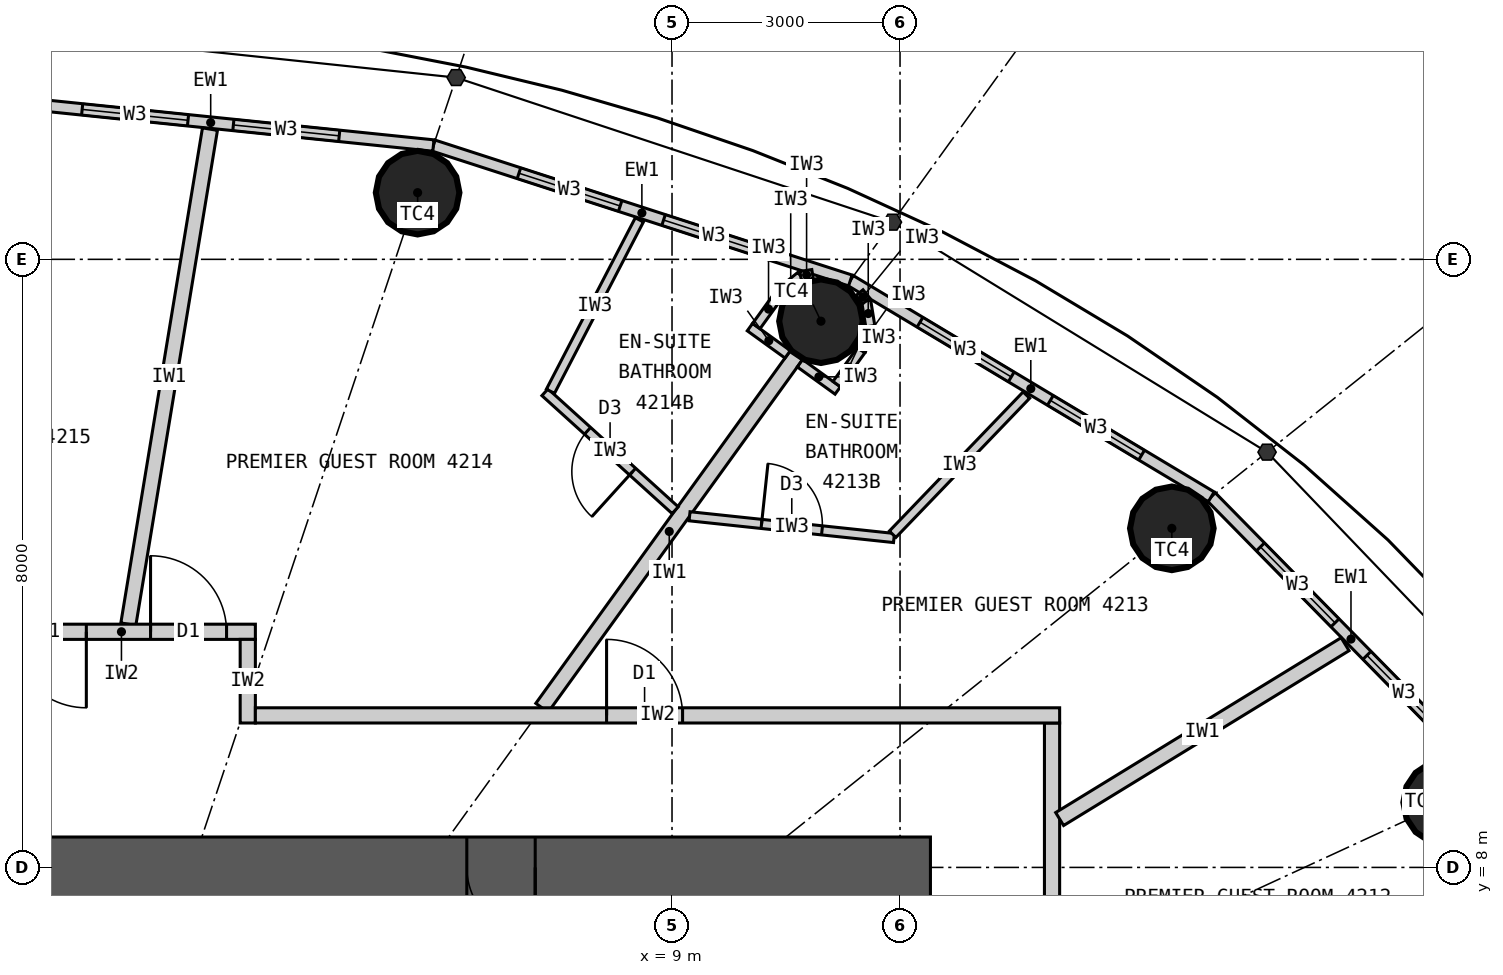
"""IFC4 building model, lengths in metres.
Left out: names, types, materials, properties, quantities, classifications, styles, units other than length and angle.
Written with IfcOpenShell. Run it as: python <this file> out.ifc"""

import sys

from ifc_helpers import new_model, si_unit, direction, frame, frame_2d, origin, origin_2d, place, context, subcontext, project, spatial, rectangle, circle, extrude, element, fill, save


model = new_model("IFC4")
c1 = context("Model", 3, precision=1e-05, world=origin(), true_north=direction((0.0, 1.0)))
c2 = subcontext(c1, "Body", "Model", "MODEL_VIEW")
j1 = project(units=[si_unit("LENGTHUNIT", "METRE"), si_unit("PLANEANGLEUNIT", "RADIAN")], contexts=[c1])
p1 = place(None, origin())
s1 = spatial("IfcSite", under=j1, at=p1, CompositionType="ELEMENT")
p2 = place(p1, origin())
s2 = spatial("IfcBuilding", under=s1, at=p2, CompositionType="ELEMENT")
p3 = place(p2, frame((0.0, 0.0, 159.9)))
s3 = spatial("IfcBuildingStorey", under=s2, at=p3, CompositionType="ELEMENT", Elevation=159.9)
for number, where, z_axis, x_axis in (
    (1, (19.172, 8.855, 0.0), (0.0, 0.0, 1.0), (1.0, 0.0, 0.0)),
    (2, (15.576, 12.461, 0.0), (0.0, 0.0, 1.0), (1.0, 0.0, 0.0)),
    (3, (10.96, 15.186, 0.0), (0.0, 0.0, 1.0), (1.0, 0.0, 0.0)),
    (4, (5.653, 16.877, 0.0), (0.0, 0.0, 1.0), (1.0, 0.0, 0.0)),
):
    element("IfcColumn", number, at=place(p3, frame(where, z_axis=z_axis, x_axis=x_axis)), inside=s3, PredefinedType="COLUMN", context=c2, shape_type="SweptSolid", body=[
        extrude(circle(Radius=0.55, at=origin_2d()), origin(), (0.0, 0.0, 1.0), 3.3),
    ])
p4 = place(p3, frame((-12.4, 8.0, 0.0), z_axis=(0.0, 0.0, 1.0), x_axis=(1.0, 0.0, 0.0)))
e5 = element("IfcWall", 5, at=p4, inside=s3, PredefinedType="SHEAR", context=c2, shape_type="SweptSolid", body=[
    extrude(rectangle(XDim=24.8, YDim=0.8, at=frame_2d((12.4, 0.0))), origin(), (0.0, 0.0, 1.0), 3.3),
])
p5 = place(p4, frame((11.1, 0.0, 0.0)))
e6 = element("IfcOpeningElement", 6, at=p5, cuts=e5, PredefinedType="OPENING", context=c2, shape_type="SweptSolid", body=[
    extrude(rectangle(XDim=1.2, YDim=2.2, at=frame_2d((0.6, 1.1))), frame((0.0, 0.41, 0.0), z_axis=(0.0, -1.0, 0.0), x_axis=(1.0, 0.0, 0.0)), (0.0, 0.0, 1.0), 0.82),
])
p6 = place(p4, frame((18.7, 0.0, 0.0)))
e7 = element("IfcOpeningElement", 7, at=p6, cuts=e5, PredefinedType="OPENING", context=c2, shape_type="SweptSolid", body=[
    extrude(rectangle(XDim=0.9, YDim=2.2, at=frame_2d((0.45, 1.1))), frame((0.0, 0.41, 0.0), z_axis=(0.0, -1.0, 0.0), x_axis=(1.0, 0.0, 0.0)), (0.0, 0.0, 1.0), 0.82),
])
p7 = place(p3, frame((19.772, 9.132, 0.0), z_axis=(0.0, 0.0, 1.0), x_axis=(-0.700727467776, 0.71342905457, 0.0)))
e8 = element("IfcWall", 8, at=p7, inside=s3, PredefinedType="ELEMENTEDWALL", context=c2, shape_type="SweptSolid", body=[
    extrude(rectangle(XDim=5.247, YDim=0.15, at=frame_2d((2.624, 0.0))), origin(), (0.0, 0.0, 1.0), 3.12),
])
p8 = place(p7, frame((0.924, 0.0, 0.9)))
e9 = element("IfcOpeningElement", 9, at=p8, cuts=e8, PredefinedType="OPENING", context=c2, shape_type="SweptSolid", body=[
    extrude(rectangle(XDim=1.4, YDim=1.9, at=frame_2d((0.7, 0.95))), frame((0.0, 0.085, 0.0), z_axis=(0.0, -1.0, 0.0), x_axis=(1.0, 0.0, 0.0)), (0.0, 0.0, 1.0), 0.17),
])
p9 = place(p7, frame((2.924, 0.0, 0.9)))
e10 = element("IfcOpeningElement", 10, at=p9, cuts=e8, PredefinedType="OPENING", context=c2, shape_type="SweptSolid", body=[
    extrude(rectangle(XDim=1.4, YDim=1.9, at=frame_2d((0.7, 0.95))), frame((0.0, 0.085, 0.0), z_axis=(0.0, -1.0, 0.0), x_axis=(1.0, 0.0, 0.0)), (0.0, 0.0, 1.0), 0.17),
])
p10 = place(p3, frame((16.095, 12.876, 0.0), z_axis=(0.0, 0.0, 1.0), x_axis=(-0.857695199231, 0.514158482587, 0.0)))
e11 = element("IfcWall", 11, at=p10, inside=s3, PredefinedType="ELEMENTEDWALL", context=c2, shape_type="SweptSolid", body=[
    extrude(rectangle(XDim=5.536, YDim=0.15, at=frame_2d((2.768, 0.0))), origin(), (0.0, 0.0, 1.0), 3.12),
])
p11 = place(p10, frame((1.068, 0.0, 0.9)))
e12 = element("IfcOpeningElement", 12, at=p11, cuts=e11, PredefinedType="OPENING", context=c2, shape_type="SweptSolid", body=[
    extrude(rectangle(XDim=1.4, YDim=1.9, at=frame_2d((0.7, 0.95))), frame((0.0, 0.085, 0.0), z_axis=(0.0, -1.0, 0.0), x_axis=(1.0, 0.0, 0.0)), (0.0, 0.0, 1.0), 0.17),
])
p12 = place(p10, frame((3.068, 0.0, 0.9)))
e13 = element("IfcOpeningElement", 13, at=p12, cuts=e11, PredefinedType="OPENING", context=c2, shape_type="SweptSolid", body=[
    extrude(rectangle(XDim=1.4, YDim=1.9, at=frame_2d((0.7, 0.95))), frame((0.0, 0.085, 0.0), z_axis=(0.0, -1.0, 0.0), x_axis=(1.0, 0.0, 0.0)), (0.0, 0.0, 1.0), 0.17),
])
p13 = place(p3, frame((11.346, 15.722, 0.0), z_axis=(0.0, 0.0, 1.0), x_axis=(-0.951432482129, 0.307857486429, 0.0)))
e14 = element("IfcWall", 14, at=p13, inside=s3, PredefinedType="ELEMENTEDWALL", context=c2, shape_type="SweptSolid", body=[
    extrude(rectangle(XDim=5.766, YDim=0.15, at=frame_2d((2.883, 0.0))), origin(), (0.0, 0.0, 1.0), 3.12),
])
p14 = place(p13, frame((1.183, 0.0, 0.9)))
e15 = element("IfcOpeningElement", 15, at=p14, cuts=e14, PredefinedType="OPENING", context=c2, shape_type="SweptSolid", body=[
    extrude(rectangle(XDim=1.4, YDim=1.9, at=frame_2d((0.7, 0.95))), frame((0.0, 0.085, 0.0), z_axis=(0.0, -1.0, 0.0), x_axis=(1.0, 0.0, 0.0)), (0.0, 0.0, 1.0), 0.17),
])
p15 = place(p13, frame((3.183, 0.0, 0.9)))
e16 = element("IfcOpeningElement", 16, at=p15, cuts=e14, PredefinedType="OPENING", context=c2, shape_type="SweptSolid", body=[
    extrude(rectangle(XDim=1.4, YDim=1.9, at=frame_2d((0.7, 0.95))), frame((0.0, 0.085, 0.0), z_axis=(0.0, -1.0, 0.0), x_axis=(1.0, 0.0, 0.0)), (0.0, 0.0, 1.0), 0.17),
])
p16 = place(p3, frame((5.86, 17.497, 0.0), z_axis=(0.0, 0.0, 1.0), x_axis=(-0.994751738032, 0.102318032045, 0.0)))
e17 = element("IfcWall", 17, at=p16, inside=s3, PredefinedType="ELEMENTEDWALL", context=c2, shape_type="SweptSolid", body=[
    extrude(rectangle(XDim=5.891, YDim=0.15, at=frame_2d((2.946, 0.0))), origin(), (0.0, 0.0, 1.0), 3.12),
])
p17 = place(p16, frame((1.246, 0.0, 0.9)))
e18 = element("IfcOpeningElement", 18, at=p17, cuts=e17, PredefinedType="OPENING", context=c2, shape_type="SweptSolid", body=[
    extrude(rectangle(XDim=1.4, YDim=1.9, at=frame_2d((0.7, 0.95))), frame((0.0, 0.085, 0.0), z_axis=(0.0, -1.0, 0.0), x_axis=(1.0, 0.0, 0.0)), (0.0, 0.0, 1.0), 0.17),
])
p18 = place(p16, frame((3.246, 0.0, 0.9)))
e19 = element("IfcOpeningElement", 19, at=p18, cuts=e17, PredefinedType="OPENING", context=c2, shape_type="SweptSolid", body=[
    extrude(rectangle(XDim=1.4, YDim=1.9, at=frame_2d((0.7, 0.95))), frame((0.0, 0.085, 0.0), z_axis=(0.0, -1.0, 0.0), x_axis=(1.0, 0.0, 0.0)), (0.0, 0.0, 1.0), 0.17),
])
p19 = place(p3, frame((14.0, -9.9, 0.0), z_axis=(0.0, 0.0, 1.0), x_axis=(0.0, 1.0, 0.0)))
e20 = element("IfcWall", 20, at=p19, inside=s3, PredefinedType="PARTITIONING", context=c2, shape_type="SweptSolid", body=[
    extrude(rectangle(XDim=19.8, YDim=0.2, at=frame_2d((9.9, 0.0))), origin(), (0.0, 0.0, 1.0), 3.12),
])
p20 = place(p19, frame((3.824, 0.0, 0.0)))
e21 = element("IfcOpeningElement", 21, at=p20, cuts=e20, PredefinedType="OPENING", context=c2, shape_type="SweptSolid", body=[
    extrude(rectangle(XDim=1.0, YDim=2.2, at=frame_2d((0.5, 1.1))), frame((0.0, 0.11, 0.0), z_axis=(0.0, -1.0, 0.0), x_axis=(1.0, 0.0, 0.0)), (0.0, 0.0, 1.0), 0.22),
])
p21 = place(p19, frame((8.719, 0.0, 0.0)))
e22 = element("IfcOpeningElement", 22, at=p21, cuts=e20, PredefinedType="OPENING", context=c2, shape_type="SweptSolid", body=[
    extrude(rectangle(XDim=1.0, YDim=2.2, at=frame_2d((0.5, 1.1))), frame((0.0, 0.11, 0.0), z_axis=(0.0, -1.0, 0.0), x_axis=(1.0, 0.0, 0.0)), (0.0, 0.0, 1.0), 0.22),
])
p22 = place(p19, frame((15.482, 0.0, 0.0)))
e23 = element("IfcOpeningElement", 23, at=p22, cuts=e20, PredefinedType="OPENING", context=c2, shape_type="SweptSolid", body=[
    extrude(rectangle(XDim=1.0, YDim=2.2, at=frame_2d((0.5, 1.1))), frame((0.0, 0.11, 0.0), z_axis=(0.0, -1.0, 0.0), x_axis=(1.0, 0.0, 0.0)), (0.0, 0.0, 1.0), 0.22),
])
p23 = place(p3, frame((14.1, 8.636, 0.0), z_axis=(0.0, 0.0, 1.0), x_axis=(0.852731884196, 0.522348862041, 0.0)))
e24 = element("IfcWall", 24, at=p23, inside=s3, PredefinedType="PARTITIONING", context=c2, shape_type="SweptSolid", body=[
    extrude(rectangle(XDim=4.404, YDim=0.2, at=frame_2d((2.202, 0.0))), origin(), (0.0, 0.0, 1.0), 3.12),
])
p24 = place(p3, frame((7.289, 10.1, 0.0), z_axis=(0.0, 0.0, 1.0), x_axis=(0.585222595178, 0.810872686735, 0.0)))
e25 = element("IfcWall", 25, at=p24, inside=s3, PredefinedType="PARTITIONING", context=c2, shape_type="SweptSolid", body=[
    extrude(rectangle(XDim=5.722, YDim=0.2, at=frame_2d((2.861, 0.0))), origin(), (0.0, 0.0, 1.0), 2.42),
])
p25 = place(p3, frame((1.847, 11.2, 0.0), z_axis=(0.0, 0.0, 1.0), x_axis=(0.162695449404, 0.986676335352, 0.0)))
e26 = element("IfcWall", 26, at=p25, inside=s3, PredefinedType="PARTITIONING", context=c2, shape_type="SweptSolid", body=[
    extrude(rectangle(XDim=6.601, YDim=0.2, at=frame_2d((3.301, 0.0))), origin(), (0.0, 0.0, 1.0), 3.12),
])
p26 = place(p3, frame((-0.006, 11.1, 0.0), z_axis=(0.0, 0.0, 1.0), x_axis=(1.0, 0.0, 0.0)))
e27 = element("IfcWall", 27, at=p26, inside=s3, PredefinedType="PARTITIONING", context=c2, shape_type="SweptSolid", body=[
    extrude(rectangle(XDim=3.524, YDim=0.2, at=frame_2d((1.762, 0.0))), origin(), (0.0, 0.0, 1.0), 3.12),
])
p27 = place(p26, frame((2.145, 0.0, 0.0)))
e28 = element("IfcOpeningElement", 28, at=p27, cuts=e27, PredefinedType="OPENING", context=c2, shape_type="SweptSolid", body=[
    extrude(rectangle(XDim=1.0, YDim=2.2, at=frame_2d((0.5, 1.1))), frame((0.0, 0.11, 0.0), z_axis=(0.0, -1.0, 0.0), x_axis=(1.0, 0.0, 0.0)), (0.0, 0.0, 1.0), 0.22),
])
p28 = place(p26, frame((0.3, 0.0, 0.0)))
e29 = element("IfcOpeningElement", 29, at=p28, cuts=e27, PredefinedType="OPENING", context=c2, shape_type="SweptSolid", body=[
    extrude(rectangle(XDim=1.0, YDim=2.2, at=frame_2d((0.5, 1.1))), frame((0.0, 0.11, 0.0), z_axis=(0.0, -1.0, 0.0), x_axis=(1.0, 0.0, 0.0)), (0.0, 0.0, 1.0), 0.22),
])
p29 = place(p3, frame((3.418, 9.9, 0.0), z_axis=(0.0, 0.0, 1.0), x_axis=(0.0, 1.0, 0.0)))
e30 = element("IfcWall", 30, at=p29, inside=s3, PredefinedType="PARTITIONING", context=c2, shape_type="SweptSolid", body=[
    extrude(rectangle(XDim=1.1, YDim=0.2, at=frame_2d((0.55, 0.0))), origin(), (0.0, 0.0, 1.0), 3.12),
])
p30 = place(p3, frame((9.231, 12.62, 0.0), z_axis=(0.0, 0.0, 1.0), x_axis=(0.99437860496, -0.10588290701, 0.0)))
e31 = element("IfcWall", 31, at=p30, inside=s3, PredefinedType="PARTITIONING", context=c2, shape_type="SweptSolid", body=[
    extrude(rectangle(XDim=2.705, YDim=0.12, at=frame_2d((1.352, 0.0))), origin(), (0.0, 0.0, 1.0), 3.12),
])
p31 = place(p30, frame((0.952, 0.0, 0.0)))
e32 = element("IfcOpeningElement", 32, at=p31, cuts=e31, PredefinedType="OPENING", context=c2, shape_type="SweptSolid", body=[
    extrude(rectangle(XDim=0.8, YDim=2.1, at=frame_2d((0.4, 1.05))), frame((0.0, 0.07, 0.0), z_axis=(0.0, -1.0, 0.0), x_axis=(1.0, 0.0, 0.0)), (0.0, 0.0, 1.0), 0.14),
])
p32 = place(p3, frame((11.902, 12.383, 0.0), z_axis=(0.0, 0.0, 1.0), x_axis=(0.69298385335, 0.720953104574, 0.0)))
e33 = element("IfcWall", 33, at=p32, inside=s3, PredefinedType="PARTITIONING", context=c2, shape_type="SweptSolid", body=[
    extrude(rectangle(XDim=2.54, YDim=0.12, at=frame_2d((1.27, 0.0))), origin(), (0.0, 0.0, 1.0), 3.12),
])
p33 = place(p3, frame((10.684, 14.633, 0.0), z_axis=(0.0, 0.0, 1.0), x_axis=(0.810921075692, -0.585155542568, 0.0)))
e34 = element("IfcWall", 34, at=p33, inside=s3, PredefinedType="PARTITIONING", context=c2, shape_type="SweptSolid", body=[
    extrude(rectangle(XDim=0.612, YDim=0.12, at=frame_2d((0.306, 0.0))), origin(), (0.0, 0.0, 1.0), 3.12),
])
p34 = place(p3, frame((11.167, 14.359, 0.0), z_axis=(0.0, 0.0, 1.0), x_axis=(0.585263549799, 0.810843127415, 0.0)))
e35 = element("IfcWall", 35, at=p34, inside=s3, PredefinedType="PARTITIONING", context=c2, shape_type="SweptSolid", body=[
    extrude(rectangle(XDim=0.55, YDim=0.12, at=frame_2d((0.275, 0.0))), origin(), (0.0, 0.0, 1.0), 3.12),
])
for number, where, z_axis, x_axis in (
    (36, (11.489, 14.804, 0.0), (0.0, 0.0, 1.0), (0.356, 0.935, 0.0)),
    (37, (11.609, 15.12, 0.0), (0.0, 0.0, 1.0), (-0.16, 0.987, 0.0)),
):
    element("IfcWall", number, at=place(p3, frame(where, z_axis=z_axis, x_axis=x_axis)), inside=s3, PredefinedType="PARTITIONING", context=c2, shape_type="SweptSolid", body=[
        extrude(rectangle(XDim=0.338, YDim=0.12, at=frame_2d((0.169, 0.0))), origin(), (0.0, 0.0, 1.0), 3.12),
    ])
p35 = place(p3, frame((11.555, 15.453, 0.0), z_axis=(0.0, 0.0, 1.0), x_axis=(-0.631711901025, 0.775203246964, 0.0)))
e38 = element("IfcWall", 38, at=p35, inside=s3, PredefinedType="PARTITIONING", context=c2, shape_type="SweptSolid", body=[
    extrude(rectangle(XDim=0.139, YDim=0.12, at=frame_2d((0.07, 0.0))), origin(), (0.0, 0.0, 1.0), 3.12),
])
p36 = place(p3, frame((9.042, 12.699, 0.0), z_axis=(0.0, 0.0, 1.0), x_axis=(-0.741100257539, 0.671394376112, 0.0)))
e39 = element("IfcWall", 39, at=p36, inside=s3, PredefinedType="PARTITIONING", context=c2, shape_type="SweptSolid", body=[
    extrude(rectangle(XDim=2.312, YDim=0.12, at=frame_2d((1.156, 0.0))), origin(), (0.0, 0.0, 1.0), 3.12),
])
p37 = place(p36, frame((0.756, 0.0, 0.0)))
e40 = element("IfcOpeningElement", 40, at=p37, cuts=e39, PredefinedType="OPENING", context=c2, shape_type="SweptSolid", body=[
    extrude(rectangle(XDim=0.8, YDim=2.1, at=frame_2d((0.4, 1.05))), frame((0.0, 0.07, 0.0), z_axis=(0.0, -1.0, 0.0), x_axis=(1.0, 0.0, 0.0)), (0.0, 0.0, 1.0), 0.14),
])
p38 = place(p3, frame((7.401, 14.264, 0.0), z_axis=(0.0, 0.0, 1.0), x_axis=(0.460505131319, 0.887657041897, 0.0)))
e41 = element("IfcWall", 41, at=p38, inside=s3, PredefinedType="PARTITIONING", context=c2, shape_type="SweptSolid", body=[
    extrude(rectangle(XDim=2.54, YDim=0.12, at=frame_2d((1.27, 0.0))), origin(), (0.0, 0.0, 1.0), 3.12),
])
p39 = place(p3, frame((10.522, 14.75, 0.0), z_axis=(0.0, 0.0, 1.0), x_axis=(-0.811057588427, 0.584966313777, 0.0)))
e42 = element("IfcWall", 42, at=p39, inside=s3, PredefinedType="PARTITIONING", context=c2, shape_type="SweptSolid", body=[
    extrude(rectangle(XDim=0.612, YDim=0.12, at=frame_2d((0.306, 0.0))), origin(), (0.0, 0.0, 1.0), 3.12),
])
p40 = place(p3, frame((10.109, 15.122, 0.0), z_axis=(0.0, 0.0, 1.0), x_axis=(0.585344718358, 0.810784534072, 0.0)))
e43 = element("IfcWall", 43, at=p40, inside=s3, PredefinedType="PARTITIONING", context=c2, shape_type="SweptSolid", body=[
    extrude(rectangle(XDim=0.55, YDim=0.12, at=frame_2d((0.275, 0.0))), origin(), (0.0, 0.0, 1.0), 3.12),
])
p41 = place(p3, frame((10.431, 15.568, 0.0), z_axis=(0.0, 0.0, 1.0), x_axis=(0.77505137267, 0.631898227345, 0.0)))
e44 = element("IfcWall", 44, at=p41, inside=s3, PredefinedType="PARTITIONING", context=c2, shape_type="SweptSolid", body=[
    extrude(rectangle(XDim=0.338, YDim=0.12, at=frame_2d((0.169, 0.0))), origin(), (0.0, 0.0, 1.0), 3.12),
])
p42 = place(p3, frame((10.693, 15.781, 0.0), z_axis=(0.0, 0.0, 1.0), x_axis=(0.987256785332, 0.159135287777, 0.0)))
e45 = element("IfcWall", 45, at=p42, inside=s3, PredefinedType="PARTITIONING", context=c2, shape_type="SweptSolid", body=[
    extrude(rectangle(XDim=0.158, YDim=0.12, at=frame_2d((0.079, 0.0))), origin(), (0.0, 0.0, 1.0), 3.12),
])
p43 = place(p3, frame((3.518, 10.0, 0.0), z_axis=(0.0, 0.0, 1.0), x_axis=(1.0, 0.0, 0.0)))
e46 = element("IfcWall", 46, at=p43, inside=s3, PredefinedType="PARTITIONING", context=c2, shape_type="SweptSolid", body=[
    extrude(rectangle(XDim=10.582, YDim=0.2, at=frame_2d((5.291, 0.0))), origin(), (0.0, 0.0, 1.0), 3.12),
])
p44 = place(p43, frame((4.621, 0.0, 0.0)))
e47 = element("IfcOpeningElement", 47, at=p44, cuts=e46, PredefinedType="OPENING", context=c2, shape_type="SweptSolid", body=[
    extrude(rectangle(XDim=1.0, YDim=2.2, at=frame_2d((0.5, 1.1))), frame((0.0, 0.11, 0.0), z_axis=(0.0, -1.0, 0.0), x_axis=(1.0, 0.0, 0.0)), (0.0, 0.0, 1.0), 0.22),
])
p45 = place(p8, origin())
e48 = element("IfcWindow", 48, at=p45, inside=s3, PartitioningType="SINGLE_PANEL", PredefinedType="WINDOW", context=c2, shape_type="SweptSolid", body=[
    extrude(rectangle(XDim=1.4, YDim=1.9, at=frame_2d((0.7, 0.95))), frame((0.0, 0.03, 0.0), z_axis=(0.0, -1.0, 0.0), x_axis=(1.0, 0.0, 0.0)), (0.0, 0.0, 1.0), 0.06),
])
fill(e9, e48)
p46 = place(p9, origin())
e49 = element("IfcWindow", 49, at=p46, inside=s3, PartitioningType="SINGLE_PANEL", PredefinedType="WINDOW", context=c2, shape_type="SweptSolid", body=[
    extrude(rectangle(XDim=1.4, YDim=1.9, at=frame_2d((0.7, 0.95))), frame((0.0, 0.03, 0.0), z_axis=(0.0, -1.0, 0.0), x_axis=(1.0, 0.0, 0.0)), (0.0, 0.0, 1.0), 0.06),
])
fill(e10, e49)
p47 = place(p11, origin())
e50 = element("IfcWindow", 50, at=p47, inside=s3, PartitioningType="SINGLE_PANEL", PredefinedType="WINDOW", context=c2, shape_type="SweptSolid", body=[
    extrude(rectangle(XDim=1.4, YDim=1.9, at=frame_2d((0.7, 0.95))), frame((0.0, 0.03, 0.0), z_axis=(0.0, -1.0, 0.0), x_axis=(1.0, 0.0, 0.0)), (0.0, 0.0, 1.0), 0.06),
])
fill(e12, e50)
p48 = place(p12, origin())
e51 = element("IfcWindow", 51, at=p48, inside=s3, PartitioningType="SINGLE_PANEL", PredefinedType="WINDOW", context=c2, shape_type="SweptSolid", body=[
    extrude(rectangle(XDim=1.4, YDim=1.9, at=frame_2d((0.7, 0.95))), frame((0.0, 0.03, 0.0), z_axis=(0.0, -1.0, 0.0), x_axis=(1.0, 0.0, 0.0)), (0.0, 0.0, 1.0), 0.06),
])
fill(e13, e51)
p49 = place(p14, origin())
e52 = element("IfcWindow", 52, at=p49, inside=s3, PartitioningType="SINGLE_PANEL", PredefinedType="WINDOW", context=c2, shape_type="SweptSolid", body=[
    extrude(rectangle(XDim=1.4, YDim=1.9, at=frame_2d((0.7, 0.95))), frame((0.0, 0.03, 0.0), z_axis=(0.0, -1.0, 0.0), x_axis=(1.0, 0.0, 0.0)), (0.0, 0.0, 1.0), 0.06),
])
fill(e15, e52)
p50 = place(p15, origin())
e53 = element("IfcWindow", 53, at=p50, inside=s3, PartitioningType="SINGLE_PANEL", PredefinedType="WINDOW", context=c2, shape_type="SweptSolid", body=[
    extrude(rectangle(XDim=1.4, YDim=1.9, at=frame_2d((0.7, 0.95))), frame((0.0, 0.03, 0.0), z_axis=(0.0, -1.0, 0.0), x_axis=(1.0, 0.0, 0.0)), (0.0, 0.0, 1.0), 0.06),
])
fill(e16, e53)
p51 = place(p17, origin())
e54 = element("IfcWindow", 54, at=p51, inside=s3, PartitioningType="SINGLE_PANEL", PredefinedType="WINDOW", context=c2, shape_type="SweptSolid", body=[
    extrude(rectangle(XDim=1.4, YDim=1.9, at=frame_2d((0.7, 0.95))), frame((0.0, 0.03, 0.0), z_axis=(0.0, -1.0, 0.0), x_axis=(1.0, 0.0, 0.0)), (0.0, 0.0, 1.0), 0.06),
])
fill(e18, e54)
p52 = place(p18, origin())
e55 = element("IfcWindow", 55, at=p52, inside=s3, PartitioningType="SINGLE_PANEL", PredefinedType="WINDOW", context=c2, shape_type="SweptSolid", body=[
    extrude(rectangle(XDim=1.4, YDim=1.9, at=frame_2d((0.7, 0.95))), frame((0.0, 0.03, 0.0), z_axis=(0.0, -1.0, 0.0), x_axis=(1.0, 0.0, 0.0)), (0.0, 0.0, 1.0), 0.06),
])
fill(e19, e55)
p53 = place(p31, origin())
e56 = element("IfcDoor", 56, at=p53, inside=s3, OperationType="SINGLE_SWING_LEFT", PredefinedType="DOOR", context=c2, shape_type="SweptSolid", body=[
    extrude(rectangle(XDim=0.8, YDim=2.1, at=frame_2d((0.4, 1.05))), frame((0.0, 0.025, 0.0), z_axis=(0.0, -1.0, 0.0), x_axis=(1.0, 0.0, 0.0)), (0.0, 0.0, 1.0), 0.05),
])
fill(e32, e56)
p54 = place(p44, origin())
e57 = element("IfcDoor", 57, at=p54, inside=s3, OperationType="SINGLE_SWING_LEFT", PredefinedType="DOOR", context=c2, shape_type="SweptSolid", body=[
    extrude(rectangle(XDim=1.0, YDim=2.2, at=frame_2d((0.5, 1.1))), frame((0.0, 0.025, 0.0), z_axis=(0.0, -1.0, 0.0), x_axis=(1.0, 0.0, 0.0)), (0.0, 0.0, 1.0), 0.05),
])
fill(e47, e57)
p55 = place(p37, origin())
e58 = element("IfcDoor", 58, at=p55, inside=s3, OperationType="SINGLE_SWING_LEFT", PredefinedType="DOOR", context=c2, shape_type="SweptSolid", body=[
    extrude(rectangle(XDim=0.8, YDim=2.1, at=frame_2d((0.4, 1.05))), frame((0.0, 0.025, 0.0), z_axis=(0.0, -1.0, 0.0), x_axis=(1.0, 0.0, 0.0)), (0.0, 0.0, 1.0), 0.05),
])
fill(e40, e58)
p56 = place(p27, origin())
e59 = element("IfcDoor", 59, at=p56, inside=s3, OperationType="SINGLE_SWING_LEFT", PredefinedType="DOOR", context=c2, shape_type="SweptSolid", body=[
    extrude(rectangle(XDim=1.0, YDim=2.2, at=frame_2d((0.5, 1.1))), frame((0.0, 0.025, 0.0), z_axis=(0.0, -1.0, 0.0), x_axis=(1.0, 0.0, 0.0)), (0.0, 0.0, 1.0), 0.05),
])
fill(e28, e59)
p57 = place(p28, origin())
e60 = element("IfcDoor", 60, at=p57, inside=s3, OperationType="SINGLE_SWING_RIGHT", PredefinedType="DOOR", context=c2, shape_type="SweptSolid", body=[
    extrude(rectangle(XDim=1.0, YDim=2.2, at=frame_2d((0.5, 1.1))), frame((0.0, 0.025, 0.0), z_axis=(0.0, -1.0, 0.0), x_axis=(1.0, 0.0, 0.0)), (0.0, 0.0, 1.0), 0.05),
])
fill(e29, e60)
p58 = place(p6, origin())
e61 = element("IfcDoor", 61, at=p58, inside=s3, OperationType="SINGLE_SWING_RIGHT", PredefinedType="DOOR", context=c2, shape_type="SweptSolid", body=[
    extrude(rectangle(XDim=0.9, YDim=2.2, at=frame_2d((0.45, 1.1))), frame((0.0, 0.025, 0.0), z_axis=(0.0, -1.0, 0.0), x_axis=(1.0, 0.0, 0.0)), (0.0, 0.0, 1.0), 0.05),
])
fill(e7, e61)
save(model, sys.argv[1])
